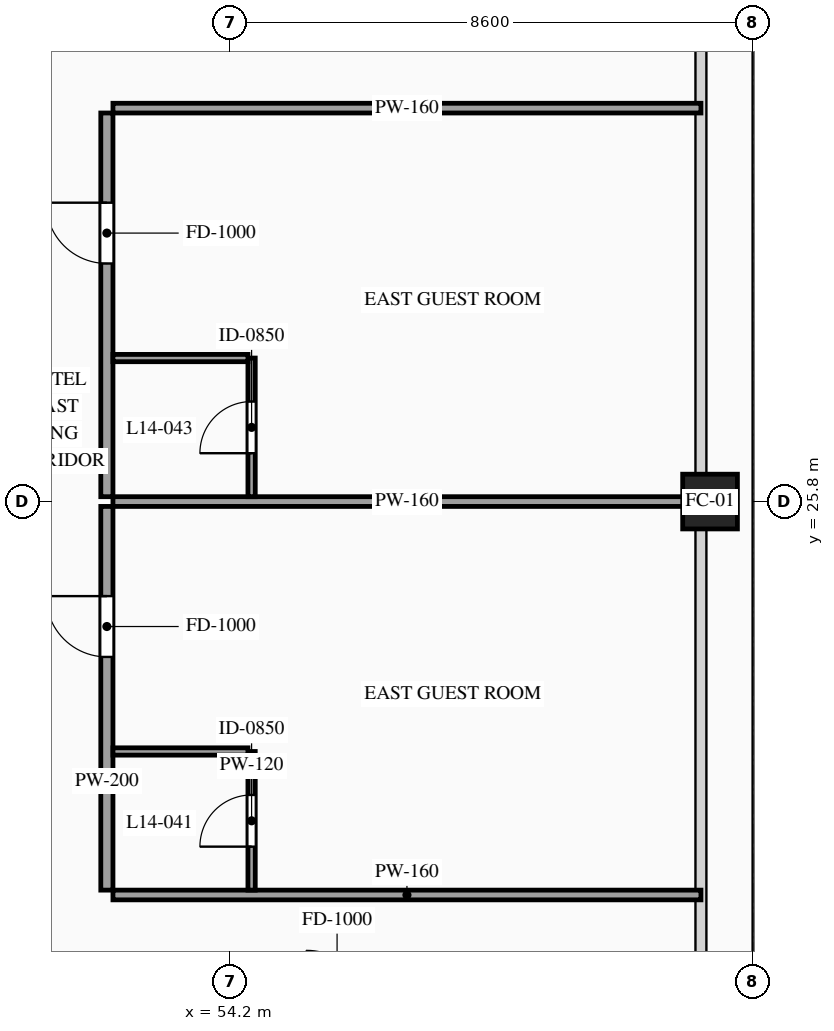
"""IFC4 building model, lengths in metres.
Left out: names, types, materials, properties, quantities, classifications, styles, units other than length and angle.
Written with IfcOpenShell. Run it as: python <this file> out.ifc"""

import sys

from ifc_helpers import new_model, si_unit, direction, frame, frame_2d, origin, origin_2d, place, context, subcontext, project, spatial, rectangle, hollow_rectangle, extrude, source, transform, mapped, element, fill, save


model = new_model("IFC4")
c1 = context("Model", 3, precision=1e-05, world=origin(), true_north=direction((0.0, 1.0)))
c2 = subcontext(c1, "Body", "Model", "MODEL_VIEW")
j1 = project(units=[si_unit("LENGTHUNIT", "METRE"), si_unit("PLANEANGLEUNIT", "RADIAN")], contexts=[c1])
p1 = place(None, origin())
s1 = spatial("IfcSite", under=j1, at=p1, CompositionType="ELEMENT")
p2 = place(p1, origin())
s2 = spatial("IfcBuilding", under=s1, at=p2, CompositionType="ELEMENT")
p3 = place(p2, frame((0.0, 0.0, 56.8)))
s3 = spatial("IfcBuildingStorey", under=s2, at=p3, CompositionType="ELEMENT", Elevation=56.8)
m1 = source(origin(), c2, "Body", "SweptSolid", [
    extrude(hollow_rectangle(XDim=0.9, YDim=0.9, WallThickness=0.042, at=origin_2d()), origin(), (0.0, 0.0, 1.0), 3.6),
])
p4 = place(p3, frame((62.1, 25.8, 0.0), z_axis=(0.0, 0.0, 1.0), x_axis=(1.0, 0.0, 0.0)))
e1 = element("IfcColumn", 1, at=p4, inside=s3, PredefinedType="COLUMN", context=c2, shape_type="MappedRepresentation", body=[
    mapped(m1, transform((0.0, 0.0, 0.0), scale=1.0)),
])
p5 = place(p3, frame((52.18, 19.41, 0.0), z_axis=(0.0, 0.0, 1.0), x_axis=(0.0, 1.0, 0.0)))
e2 = element("IfcWall", 2, at=p5, inside=s3, PredefinedType="PARTITIONING", context=c2, shape_type="SweptSolid", body=[
    extrude(rectangle(XDim=6.31, YDim=0.2, at=frame_2d((3.155, 0.0))), origin(), (0.0, 0.0, 1.0), 3.38),
])
p6 = place(p5, frame((3.835, 0.0, 0.0)))
e3 = element("IfcOpeningElement", 3, at=p6, cuts=e2, PredefinedType="OPENING", context=c2, shape_type="SweptSolid", body=[
    extrude(rectangle(XDim=1.0, YDim=2.2, at=frame_2d((0.5, 1.1))), frame((0.0, 0.115, 0.0), z_axis=(0.0, -1.0, 0.0), x_axis=(1.0, 0.0, 0.0)), (0.0, 0.0, 1.0), 0.23),
])
m2 = source(origin(), c2, "Body", "SweptSolid", [
    extrude(rectangle(XDim=9.67, YDim=0.16, at=frame_2d((4.835, 0.0))), origin(), (0.0, 0.0, 1.0), 2.575),
])
p7 = place(p3, frame((52.28, 25.8, 0.0), z_axis=(0.0, 0.0, 1.0), x_axis=(1.0, 0.0, 0.0)))
e4 = element("IfcWall", 4, at=p7, inside=s3, PredefinedType="PARTITIONING", context=c2, shape_type="MappedRepresentation", body=[
    mapped(m2, transform((0.0, 0.0, 0.0), scale=1.0)),
])
m3 = source(origin(), c2, "Body", "SweptSolid", [
    extrude(rectangle(XDim=9.67, YDim=0.16, at=frame_2d((4.835, 0.0))), origin(), (0.0, 0.0, 1.0), 2.875),
])
p8 = place(p3, frame((52.28, 19.33, 0.0), z_axis=(0.0, 0.0, 1.0), x_axis=(1.0, 0.0, 0.0)))
e5 = element("IfcWall", 5, at=p8, inside=s3, PredefinedType="PARTITIONING", context=c2, shape_type="MappedRepresentation", body=[
    mapped(m3, transform((0.0, 0.0, 0.0), scale=1.0)),
])
p9 = place(p3, frame((54.56, 19.41, 0.0), z_axis=(0.0, 0.0, 1.0), x_axis=(0.0, 1.0, 0.0)))
e6 = element("IfcWall", 6, at=p9, inside=s3, PredefinedType="PARTITIONING", context=c2, shape_type="SweptSolid", body=[
    extrude(rectangle(XDim=2.28, YDim=0.12, at=frame_2d((1.14, 0.0))), origin(), (0.0, 0.0, 1.0), 3.38),
])
p10 = place(p9, frame((0.715, 0.0, 0.0)))
e7 = element("IfcOpeningElement", 7, at=p10, cuts=e6, PredefinedType="OPENING", context=c2, shape_type="SweptSolid", body=[
    extrude(rectangle(XDim=0.85, YDim=2.1, at=frame_2d((0.425, 1.05))), frame((0.0, 0.075, 0.0), z_axis=(0.0, -1.0, 0.0), x_axis=(1.0, 0.0, 0.0)), (0.0, 0.0, 1.0), 0.15),
])
m4 = source(origin(), c2, "Body", "SweptSolid", [
    extrude(rectangle(XDim=2.22, YDim=0.12, at=frame_2d((1.11, 0.0))), origin(), (0.0, 0.0, 1.0), 3.38),
])
p11 = place(p3, frame((52.28, 21.69, 0.0), z_axis=(0.0, 0.0, 1.0), x_axis=(1.0, 0.0, 0.0)))
e8 = element("IfcWall", 8, at=p11, inside=s3, PredefinedType="PARTITIONING", context=c2, shape_type="MappedRepresentation", body=[
    mapped(m4, transform((0.0, 0.0, 0.0), scale=1.0)),
])
p12 = place(p3, frame((52.18, 25.88, 0.0), z_axis=(0.0, 0.0, 1.0), x_axis=(0.0, 1.0, 0.0)))
e9 = element("IfcWall", 9, at=p12, inside=s3, PredefinedType="PARTITIONING", context=c2, shape_type="SweptSolid", body=[
    extrude(rectangle(XDim=6.31, YDim=0.2, at=frame_2d((3.155, 0.0))), origin(), (0.0, 0.0, 1.0), 3.38),
])
p13 = place(p12, frame((3.835, 0.0, 0.0)))
e10 = element("IfcOpeningElement", 10, at=p13, cuts=e9, PredefinedType="OPENING", context=c2, shape_type="SweptSolid", body=[
    extrude(rectangle(XDim=1.0, YDim=2.2, at=frame_2d((0.5, 1.1))), frame((0.0, 0.115, 0.0), z_axis=(0.0, -1.0, 0.0), x_axis=(1.0, 0.0, 0.0)), (0.0, 0.0, 1.0), 0.23),
])
p14 = place(p3, frame((52.28, 32.27, 0.0), z_axis=(0.0, 0.0, 1.0), x_axis=(1.0, 0.0, 0.0)))
e11 = element("IfcWall", 11, at=p14, inside=s3, PredefinedType="PARTITIONING", context=c2, shape_type="MappedRepresentation", body=[
    mapped(m3, transform((0.0, 0.0, 0.0), scale=1.0)),
])
p15 = place(p3, frame((54.56, 25.88, 0.0), z_axis=(0.0, 0.0, 1.0), x_axis=(0.0, 1.0, 0.0)))
e12 = element("IfcWall", 12, at=p15, inside=s3, PredefinedType="PARTITIONING", context=c2, shape_type="SweptSolid", body=[
    extrude(rectangle(XDim=2.28, YDim=0.12, at=frame_2d((1.14, 0.0))), origin(), (0.0, 0.0, 1.0), 3.38),
])
p16 = place(p15, frame((0.715, 0.0, 0.0)))
e13 = element("IfcOpeningElement", 13, at=p16, cuts=e12, PredefinedType="OPENING", context=c2, shape_type="SweptSolid", body=[
    extrude(rectangle(XDim=0.85, YDim=2.1, at=frame_2d((0.425, 1.05))), frame((0.0, 0.075, 0.0), z_axis=(0.0, -1.0, 0.0), x_axis=(1.0, 0.0, 0.0)), (0.0, 0.0, 1.0), 0.15),
])
p17 = place(p3, frame((52.28, 28.16, 0.0), z_axis=(0.0, 0.0, 1.0), x_axis=(1.0, 0.0, 0.0)))
e14 = element("IfcWall", 14, at=p17, inside=s3, PredefinedType="PARTITIONING", context=c2, shape_type="MappedRepresentation", body=[
    mapped(m4, transform((0.0, 0.0, 0.0), scale=1.0)),
])
m5 = source(origin(), c2, "Body", "SweptSolid", [
    extrude(rectangle(XDim=1.0, YDim=2.2, at=frame_2d((0.5, 1.1))), frame((0.0, 0.025, 0.0), z_axis=(0.0, -1.0, 0.0), x_axis=(1.0, 0.0, 0.0)), (0.0, 0.0, 1.0), 0.05),
])
p18 = place(p6, origin())
e15 = element("IfcDoor", 15, at=p18, inside=s3, OperationType="SINGLE_SWING_RIGHT", PredefinedType="DOOR", context=c2, shape_type="MappedRepresentation", body=[
    mapped(m5, transform((0.0, 0.0, 0.0), scale=1.0)),
])
fill(e3, e15)
m6 = source(origin(), c2, "Body", "SweptSolid", [
    extrude(rectangle(XDim=0.85, YDim=2.1, at=frame_2d((0.425, 1.05))), frame((0.0, 0.025, 0.0), z_axis=(0.0, -1.0, 0.0), x_axis=(1.0, 0.0, 0.0)), (0.0, 0.0, 1.0), 0.05),
])
p19 = place(p10, origin())
e16 = element("IfcDoor", 16, at=p19, inside=s3, OperationType="SINGLE_SWING_LEFT", PredefinedType="DOOR", context=c2, shape_type="MappedRepresentation", body=[
    mapped(m6, transform((0.0, 0.0, 0.0), scale=1.0)),
])
fill(e7, e16)
p20 = place(p13, origin())
e17 = element("IfcDoor", 17, at=p20, inside=s3, OperationType="SINGLE_SWING_RIGHT", PredefinedType="DOOR", context=c2, shape_type="MappedRepresentation", body=[
    mapped(m5, transform((0.0, 0.0, 0.0), scale=1.0)),
])
fill(e10, e17)
p21 = place(p16, origin())
e18 = element("IfcDoor", 18, at=p21, inside=s3, OperationType="SINGLE_SWING_LEFT", PredefinedType="DOOR", context=c2, shape_type="MappedRepresentation", body=[
    mapped(m6, transform((0.0, 0.0, 0.0), scale=1.0)),
])
fill(e13, e18)
save(model, sys.argv[1])
